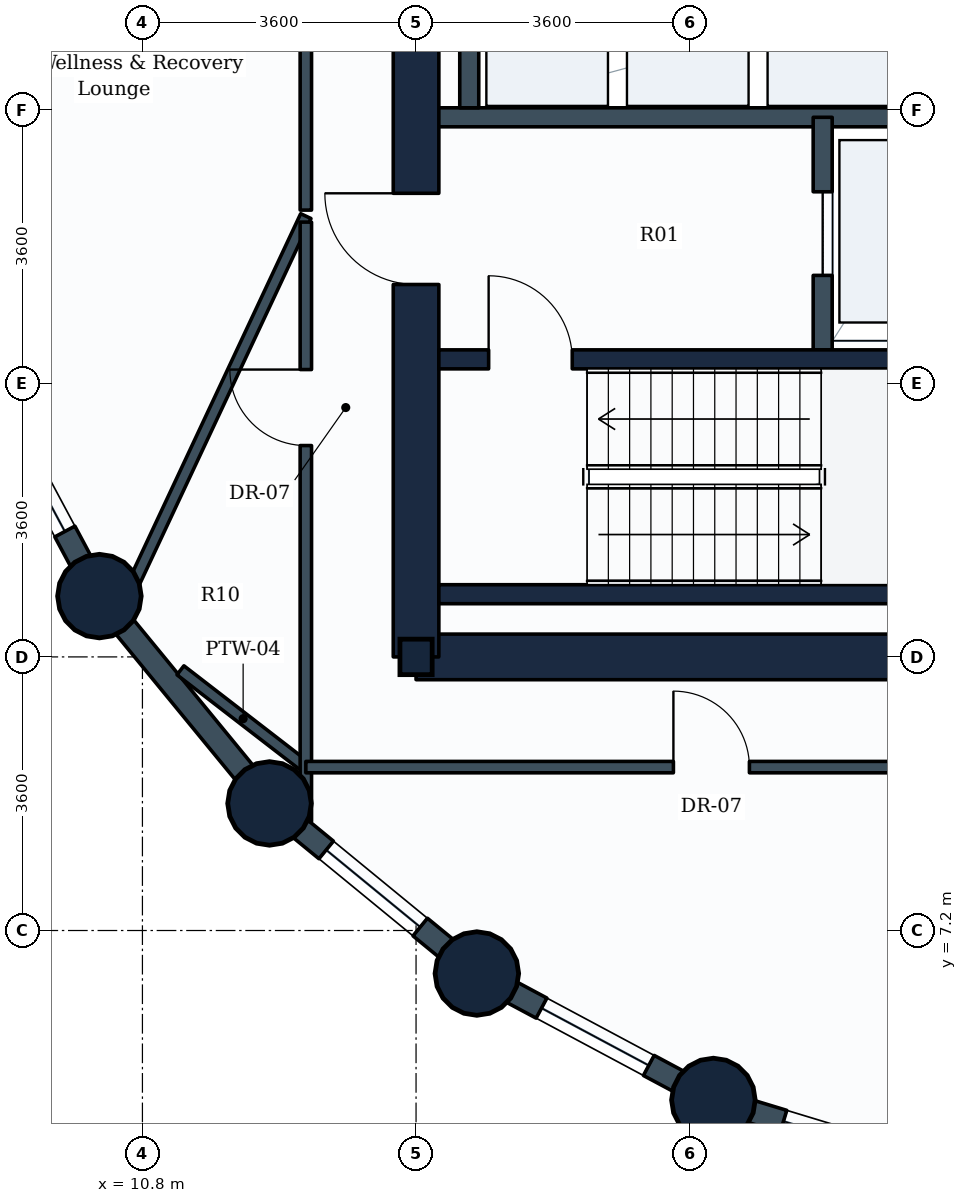
"""IFC4 building model, lengths in metres.
Left out: names, types, materials, properties, quantities, classifications, styles, units other than length and angle.
Written with IfcOpenShell. Run it as: python <this file> out.ifc"""

import sys

from ifc_helpers import new_model, si_unit, direction, frame, frame_2d, origin, origin_2d, place, context, subcontext, project, spatial, rectangle, circle, i_section, extrude, element, fill, save


model = new_model("IFC4")
c1 = context("Model", 3, precision=1e-05, world=origin(), true_north=direction((0.0, 1.0)))
c2 = subcontext(c1, "Body", "Model", "MODEL_VIEW")
j1 = project(units=[si_unit("LENGTHUNIT", "METRE"), si_unit("PLANEANGLEUNIT", "RADIAN")], contexts=[c1])
p1 = place(None, origin())
s1 = spatial("IfcSite", under=j1, at=p1, CompositionType="ELEMENT")
p2 = place(p1, origin())
s2 = spatial("IfcBuilding", under=s1, at=p2, CompositionType="ELEMENT")
p3 = place(p2, frame((0.0, 0.0, 47.4)))
s3 = spatial("IfcBuildingStorey", under=s2, at=p3, CompositionType="ELEMENT", Elevation=47.4)
for number, where, z_axis, x_axis in (
    (1, (10.234, 11.6, 0.0), (0.0, 0.0, 1.0), (1.0, 0.0, 0.0)),
    (2, (12.472, 8.872, 0.0), (0.0, 0.0, 1.0), (1.0, 0.0, 0.0)),
):
    element("IfcColumn", number, at=place(p3, frame(where, z_axis=z_axis, x_axis=x_axis)), inside=s3, PredefinedType="COLUMN", context=c2, shape_type="SweptSolid", body=[
        extrude(circle(Radius=0.55, at=origin_2d()), origin(), (0.0, 0.0, 1.0), 3.9),
    ])
p4 = place(p3, frame((14.4, 10.8, 0.0), z_axis=(0.0, 0.0, 1.0), x_axis=(1.0, 0.0, 0.0)))
e3 = element("IfcColumn", 3, at=p4, inside=s3, PredefinedType="COLUMN", context=c2, shape_type="SweptSolid", body=[
    extrude(i_section(OverallWidth=0.424, OverallDepth=0.467, WebThickness=0.033, FlangeThickness=0.053, FilletRadius=0.015, at=origin_2d()), origin(), (0.0, 0.0, 1.0), 3.9),
])
for number, where, z_axis, x_axis in (
    (4, (15.2, 6.634, 0.0), (0.0, 0.0, 1.0), (1.0, 0.0, 0.0)),
    (5, (18.312, 4.97, 0.0), (0.0, 0.0, 1.0), (1.0, 0.0, 0.0)),
):
    element("IfcColumn", number, at=place(p3, frame(where, z_axis=z_axis, x_axis=x_axis)), inside=s3, PredefinedType="COLUMN", context=c2, shape_type="SweptSolid", body=[
        extrude(circle(Radius=0.55, at=origin_2d()), origin(), (0.0, 0.0, 1.0), 3.9),
    ])
p5 = place(p3, frame((10.234, 11.6, 0.0), z_axis=(0.0, 0.0, 1.0), x_axis=(-0.47151087309, 0.881860247748, 0.0)))
e6 = element("IfcWall", 6, at=p5, inside=s3, PredefinedType="STANDARD", context=c2, shape_type="SweptSolid", body=[
    extrude(rectangle(XDim=3.529, YDim=0.3, at=frame_2d((1.764, 0.0))), origin(), (0.0, 0.0, 1.0), 2.93),
])
p6 = place(p5, frame((0.964, 0.0, 0.85)))
e7 = element("IfcOpeningElement", 7, at=p6, cuts=e6, PredefinedType="OPENING", context=c2, shape_type="SweptSolid", body=[
    extrude(rectangle(XDim=1.6, YDim=1.35, at=frame_2d((0.8, 0.675))), frame((0.0, 0.16, 0.0), z_axis=(0.0, -1.0, 0.0), x_axis=(1.0, 0.0, 0.0)), (0.0, 0.0, 1.0), 0.32),
])
p7 = place(p3, frame((12.472, 8.872, 0.0), z_axis=(0.0, 0.0, 1.0), x_axis=(-0.634258295121, 0.773121216285, 0.0)))
e8 = element("IfcWall", 8, at=p7, inside=s3, PredefinedType="STANDARD", context=c2, shape_type="SweptSolid", body=[
    extrude(rectangle(XDim=3.529, YDim=0.3, at=frame_2d((1.764, 0.0))), origin(), (0.0, 0.0, 1.0), 2.93),
])
p8 = place(p3, frame((15.2, 6.634, 0.0), z_axis=(0.0, 0.0, 1.0), x_axis=(-0.773121216285, 0.634258295121, 0.0)))
e9 = element("IfcWall", 9, at=p8, inside=s3, PredefinedType="STANDARD", context=c2, shape_type="SweptSolid", body=[
    extrude(rectangle(XDim=3.529, YDim=0.3, at=frame_2d((1.764, 0.0))), origin(), (0.0, 0.0, 1.0), 2.93),
])
p9 = place(p8, frame((0.964, 0.0, 0.85)))
e10 = element("IfcOpeningElement", 10, at=p9, cuts=e9, PredefinedType="OPENING", context=c2, shape_type="SweptSolid", body=[
    extrude(rectangle(XDim=1.6, YDim=1.35, at=frame_2d((0.8, 0.675))), frame((0.0, 0.16, 0.0), z_axis=(0.0, -1.0, 0.0), x_axis=(1.0, 0.0, 0.0)), (0.0, 0.0, 1.0), 0.32),
])
p10 = place(p3, frame((18.312, 4.97, 0.0), z_axis=(0.0, 0.0, 1.0), x_axis=(-0.881846862014, 0.471535907389, 0.0)))
e11 = element("IfcWall", 11, at=p10, inside=s3, PredefinedType="STANDARD", context=c2, shape_type="SweptSolid", body=[
    extrude(rectangle(XDim=3.529, YDim=0.3, at=frame_2d((1.765, 0.0))), origin(), (0.0, 0.0, 1.0), 2.93),
])
p11 = place(p10, frame((0.964, 0.0, 0.85)))
e12 = element("IfcOpeningElement", 12, at=p11, cuts=e11, PredefinedType="OPENING", context=c2, shape_type="SweptSolid", body=[
    extrude(rectangle(XDim=1.6, YDim=1.35, at=frame_2d((0.8, 0.675))), frame((0.0, 0.16, 0.0), z_axis=(0.0, -1.0, 0.0), x_axis=(1.0, 0.0, 0.0)), (0.0, 0.0, 1.0), 0.32),
])
p12 = place(p3, frame((21.688, 3.946, 0.0), z_axis=(0.0, 0.0, 1.0), x_axis=(-0.956953367403, 0.290241714123, 0.0)))
e13 = element("IfcWall", 13, at=p12, inside=s3, PredefinedType="STANDARD", context=c2, shape_type="SweptSolid", body=[
    extrude(rectangle(XDim=3.528, YDim=0.3, at=frame_2d((1.764, 0.0))), origin(), (0.0, 0.0, 1.0), 2.93),
])
p13 = place(p12, frame((0.964, 0.0, 0.85)))
e14 = element("IfcOpeningElement", 14, at=p13, cuts=e13, PredefinedType="OPENING", context=c2, shape_type="SweptSolid", body=[
    extrude(rectangle(XDim=1.6, YDim=1.35, at=frame_2d((0.8, 0.675))), frame((0.0, 0.16, 0.0), z_axis=(0.0, -1.0, 0.0), x_axis=(1.0, 0.0, 0.0)), (0.0, 0.0, 1.0), 0.32),
])
p14 = place(p3, frame((14.4, 10.8, 0.0), z_axis=(0.0, 0.0, 1.0), x_axis=(1.0, 0.0, 0.0)))
e15 = element("IfcWall", 15, at=p14, inside=s3, PredefinedType="SHEAR", context=c2, shape_type="SweptSolid", body=[
    extrude(rectangle(XDim=18.0, YDim=0.6, at=frame_2d((9.0, 0.0))), origin(), (0.0, 0.0, 1.0), 3.65),
])
p15 = place(p3, frame((14.4, 10.8, 0.0), z_axis=(0.0, 0.0, 1.0), x_axis=(0.0, 1.0, 0.0)))
e16 = element("IfcWall", 16, at=p15, inside=s3, PredefinedType="SHEAR", context=c2, shape_type="SweptSolid", body=[
    extrude(rectangle(XDim=14.4, YDim=0.6, at=frame_2d((7.2, 0.0))), origin(), (0.0, 0.0, 1.0), 3.65),
])
p16 = place(p15, frame((11.05, 0.0, 0.0)))
e17 = element("IfcOpeningElement", 17, at=p16, cuts=e16, PredefinedType="OPENING", context=c2, shape_type="SweptSolid", body=[
    extrude(rectangle(XDim=1.1, YDim=2.1, at=frame_2d((0.55, 1.05))), frame((0.0, 0.31, 0.0), z_axis=(0.0, -1.0, 0.0), x_axis=(1.0, 0.0, 0.0)), (0.0, 0.0, 1.0), 0.62),
])
p17 = place(p15, frame((4.9, 0.0, 0.0)))
e18 = element("IfcOpeningElement", 18, at=p17, cuts=e16, PredefinedType="OPENING", context=c2, shape_type="SweptSolid", body=[
    extrude(rectangle(XDim=1.2, YDim=2.1, at=frame_2d((0.6, 1.05))), frame((0.0, 0.31, 0.0), z_axis=(0.0, -1.0, 0.0), x_axis=(1.0, 0.0, 0.0)), (0.0, 0.0, 1.0), 0.62),
])
p18 = place(p3, frame((14.7, 11.625, 0.0), z_axis=(0.0, 0.0, 1.0), x_axis=(1.0, 0.0, 0.0)))
e19 = element("IfcWall", 19, at=p18, inside=s3, PredefinedType="SHEAR", context=c2, shape_type="SweptSolid", body=[
    extrude(rectangle(XDim=8.65, YDim=0.25, at=frame_2d((4.325, 0.0))), origin(), (0.0, 0.0, 1.0), 3.65),
])
p19 = place(p3, frame((14.7, 14.715, 0.0), z_axis=(0.0, 0.0, 1.0), x_axis=(1.0, 0.0, 0.0)))
e20 = element("IfcWall", 20, at=p19, inside=s3, PredefinedType="SHEAR", context=c2, shape_type="SweptSolid", body=[
    extrude(rectangle(XDim=8.65, YDim=0.25, at=frame_2d((4.325, 0.0))), origin(), (0.0, 0.0, 1.0), 3.65),
])
p20 = place(p19, frame((0.655, 0.0, 0.0)))
e21 = element("IfcOpeningElement", 21, at=p20, cuts=e20, PredefinedType="OPENING", context=c2, shape_type="SweptSolid", body=[
    extrude(rectangle(XDim=1.1, YDim=2.1, at=frame_2d((0.55, 1.05))), frame((0.0, 0.135, 0.0), z_axis=(0.0, -1.0, 0.0), x_axis=(1.0, 0.0, 0.0)), (0.0, 0.0, 1.0), 0.27),
])
p21 = place(p3, frame((14.65, 17.9, 0.0), z_axis=(0.0, 0.0, 1.0), x_axis=(1.0, 0.0, 0.0)))
e22 = element("IfcWall", 22, at=p21, inside=s3, PredefinedType="PARTITIONING", context=c2, shape_type="SweptSolid", body=[
    extrude(rectangle(XDim=7.15, YDim=0.25, at=frame_2d((3.575, 0.0))), origin(), (0.0, 0.0, 1.0), 3.635),
])
p22 = place(p3, frame((19.75, 14.84, 0.0), z_axis=(0.0, 0.0, 1.0), x_axis=(0.0, 1.0, 0.0)))
e23 = element("IfcWall", 23, at=p22, inside=s3, PredefinedType="PARTITIONING", context=c2, shape_type="SweptSolid", body=[
    extrude(rectangle(XDim=3.06, YDim=0.25, at=frame_2d((1.53, 0.0))), origin(), (0.0, 0.0, 1.0), 3.635),
])
p23 = place(p22, frame((0.98, 0.0, 0.0)))
e24 = element("IfcOpeningElement", 24, at=p23, cuts=e23, PredefinedType="OPENING", context=c2, shape_type="SweptSolid", body=[
    extrude(rectangle(XDim=1.1, YDim=2.1, at=frame_2d((0.55, 1.05))), frame((0.0, 0.135, 0.0), z_axis=(0.0, -1.0, 0.0), x_axis=(1.0, 0.0, 0.0)), (0.0, 0.0, 1.0), 0.27),
])
p24 = place(p3, frame((15.1, 18.025, 0.0), z_axis=(0.0, 0.0, 1.0), x_axis=(0.0, 1.0, 0.0)))
e25 = element("IfcWall", 25, at=p24, inside=s3, PredefinedType="PARTITIONING", context=c2, shape_type="SweptSolid", body=[
    extrude(rectangle(XDim=1.975, YDim=0.25, at=frame_2d((0.988, 0.0))), origin(), (0.0, 0.0, 1.0), 3.635),
])
p25 = place(p3, frame((12.95, 9.35, 0.0), z_axis=(0.0, 0.0, 1.0), x_axis=(-0.791573423038, 0.611074067474, 0.0)))
e26 = element("IfcWall", 26, at=p25, inside=s3, PredefinedType="PARTITIONING", context=c2, shape_type="SweptSolid", body=[
    extrude(rectangle(XDim=2.084, YDim=0.15, at=frame_2d((1.042, 0.0))), origin(), (0.0, 0.0, 1.0), 2.93),
])
p26 = place(p3, frame((12.95, 16.6, 0.0), z_axis=(0.0, 0.0, 1.0), x_axis=(-0.424335060038, -0.905505249473, 0.0)))
e27 = element("IfcWall", 27, at=p26, inside=s3, PredefinedType="PARTITIONING", context=c2, shape_type="SweptSolid", body=[
    extrude(rectangle(XDim=5.76, YDim=0.15, at=frame_2d((2.88, 0.0))), origin(), (0.0, 0.0, 1.0), 2.93),
])
p27 = place(p3, frame((12.95, 16.679, 0.0), z_axis=(0.0, 0.0, 1.0), x_axis=(0.0, 1.0, 0.0)))
e28 = element("IfcWall", 28, at=p27, inside=s3, PredefinedType="PARTITIONING", context=c2, shape_type="SweptSolid", body=[
    extrude(rectangle(XDim=8.442, YDim=0.15, at=frame_2d((4.221, 0.0))), origin(), (0.0, 0.0, 1.0), 3.08),
])
p28 = place(p27, frame((3.721, 0.0, 0.0)))
e29 = element("IfcOpeningElement", 29, at=p28, cuts=e28, PredefinedType="OPENING", context=c2, shape_type="SweptSolid", body=[
    extrude(rectangle(XDim=1.0, YDim=2.1, at=frame_2d((0.5, 1.05))), frame((0.0, 0.085, 0.0), z_axis=(0.0, -1.0, 0.0), x_axis=(1.0, 0.0, 0.0)), (0.0, 0.0, 1.0), 0.17),
])
p29 = place(p3, frame((12.95, 8.634, 0.0), z_axis=(0.0, 0.0, 1.0), x_axis=(0.0, 1.0, 0.0)))
e30 = element("IfcWall", 30, at=p29, inside=s3, PredefinedType="PARTITIONING", context=c2, shape_type="SweptSolid", body=[
    extrude(rectangle(XDim=7.887, YDim=0.15, at=frame_2d((3.944, 0.0))), origin(), (0.0, 0.0, 1.0), 2.93),
])
p30 = place(p29, frame((4.947, 0.0, 0.0)))
e31 = element("IfcOpeningElement", 31, at=p30, cuts=e30, PredefinedType="OPENING", context=c2, shape_type="SweptSolid", body=[
    extrude(rectangle(XDim=1.0, YDim=2.1, at=frame_2d((0.5, 1.05))), frame((0.0, 0.085, 0.0), z_axis=(0.0, -1.0, 0.0), x_axis=(1.0, 0.0, 0.0)), (0.0, 0.0, 1.0), 0.17),
])
p31 = place(p3, frame((12.95, 9.35, 0.0), z_axis=(0.0, 0.0, 1.0), x_axis=(1.0, 0.0, 0.0)))
e32 = element("IfcWall", 32, at=p31, inside=s3, PredefinedType="PARTITIONING", context=c2, shape_type="SweptSolid", body=[
    extrude(rectangle(XDim=15.771, YDim=0.15, at=frame_2d((7.885, 0.0))), origin(), (0.0, 0.0, 1.0), 3.04),
])
p32 = place(p31, frame((4.836, 0.0, 0.0)))
e33 = element("IfcOpeningElement", 33, at=p32, cuts=e32, PredefinedType="OPENING", context=c2, shape_type="SweptSolid", body=[
    extrude(rectangle(XDim=1.0, YDim=2.1, at=frame_2d((0.5, 1.05))), frame((0.0, 0.085, 0.0), z_axis=(0.0, -1.0, 0.0), x_axis=(1.0, 0.0, 0.0)), (0.0, 0.0, 1.0), 0.17),
])
p33 = place(p6, origin())
e34 = element("IfcWindow", 34, at=p33, inside=s3, PartitioningType="SINGLE_PANEL", PredefinedType="WINDOW", context=c2, shape_type="SweptSolid", body=[
    extrude(rectangle(XDim=1.6, YDim=1.35, at=frame_2d((0.8, 0.675))), frame((0.0, 0.03, 0.0), z_axis=(0.0, -1.0, 0.0), x_axis=(1.0, 0.0, 0.0)), (0.0, 0.0, 1.0), 0.06),
])
fill(e7, e34)
p34 = place(p9, origin())
e35 = element("IfcWindow", 35, at=p34, inside=s3, PartitioningType="SINGLE_PANEL", PredefinedType="WINDOW", context=c2, shape_type="SweptSolid", body=[
    extrude(rectangle(XDim=1.6, YDim=1.35, at=frame_2d((0.8, 0.675))), frame((0.0, 0.03, 0.0), z_axis=(0.0, -1.0, 0.0), x_axis=(1.0, 0.0, 0.0)), (0.0, 0.0, 1.0), 0.06),
])
fill(e10, e35)
p35 = place(p11, origin())
e36 = element("IfcWindow", 36, at=p35, inside=s3, PartitioningType="SINGLE_PANEL", PredefinedType="WINDOW", context=c2, shape_type="SweptSolid", body=[
    extrude(rectangle(XDim=1.6, YDim=1.35, at=frame_2d((0.8, 0.675))), frame((0.0, 0.03, 0.0), z_axis=(0.0, -1.0, 0.0), x_axis=(1.0, 0.0, 0.0)), (0.0, 0.0, 1.0), 0.06),
])
fill(e12, e36)
p36 = place(p13, origin())
e37 = element("IfcWindow", 37, at=p36, inside=s3, PartitioningType="SINGLE_PANEL", PredefinedType="WINDOW", context=c2, shape_type="SweptSolid", body=[
    extrude(rectangle(XDim=1.6, YDim=1.35, at=frame_2d((0.8, 0.675))), frame((0.0, 0.03, 0.0), z_axis=(0.0, -1.0, 0.0), x_axis=(1.0, 0.0, 0.0)), (0.0, 0.0, 1.0), 0.06),
])
fill(e14, e37)
p37 = place(p20, origin())
e38 = element("IfcDoor", 38, at=p37, inside=s3, OperationType="SINGLE_SWING_LEFT", PredefinedType="DOOR", context=c2, shape_type="SweptSolid", body=[
    extrude(rectangle(XDim=1.1, YDim=2.1, at=frame_2d((0.55, 1.05))), frame((0.0, 0.025, 0.0), z_axis=(0.0, -1.0, 0.0), x_axis=(1.0, 0.0, 0.0)), (0.0, 0.0, 1.0), 0.05),
])
fill(e21, e38)
p38 = place(p23, origin())
e39 = element("IfcDoor", 39, at=p38, inside=s3, OperationType="SLIDING_TO_LEFT", PredefinedType="DOOR", context=c2, shape_type="SweptSolid", body=[
    extrude(rectangle(XDim=1.1, YDim=2.1, at=frame_2d((0.55, 1.05))), frame((0.0, 0.025, 0.0), z_axis=(0.0, -1.0, 0.0), x_axis=(1.0, 0.0, 0.0)), (0.0, 0.0, 1.0), 0.05),
])
fill(e24, e39)
p39 = place(p17, origin())
e40 = element("IfcDoor", 40, at=p39, inside=s3, OperationType="SINGLE_SWING_RIGHT", PredefinedType="DOOR", context=c2, shape_type="SweptSolid", body=[
    extrude(rectangle(XDim=1.2, YDim=2.1, at=frame_2d((0.6, 1.05))), frame((0.0, 0.025, 0.0), z_axis=(0.0, -1.0, 0.0), x_axis=(1.0, 0.0, 0.0)), (0.0, 0.0, 1.0), 0.05),
])
fill(e18, e40)
p40 = place(p30, origin())
e41 = element("IfcDoor", 41, at=p40, inside=s3, OperationType="SINGLE_SWING_RIGHT", PredefinedType="DOOR", context=c2, shape_type="SweptSolid", body=[
    extrude(rectangle(XDim=1.0, YDim=2.1, at=frame_2d((0.5, 1.05))), frame((0.0, 0.025, 0.0), z_axis=(0.0, -1.0, 0.0), x_axis=(1.0, 0.0, 0.0)), (0.0, 0.0, 1.0), 0.05),
])
fill(e31, e41)
p41 = place(p32, origin())
e42 = element("IfcDoor", 42, at=p41, inside=s3, OperationType="SINGLE_SWING_LEFT", PredefinedType="DOOR", context=c2, shape_type="SweptSolid", body=[
    extrude(rectangle(XDim=1.0, YDim=2.1, at=frame_2d((0.5, 1.05))), frame((0.0, 0.025, 0.0), z_axis=(0.0, -1.0, 0.0), x_axis=(1.0, 0.0, 0.0)), (0.0, 0.0, 1.0), 0.05),
])
fill(e33, e42)
save(model, sys.argv[1])
